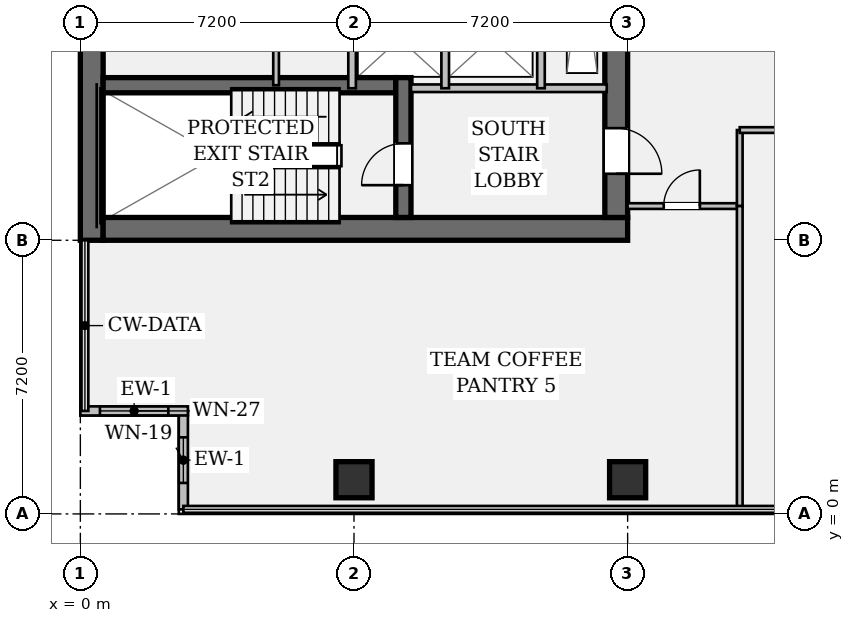
"""IFC4 building model, lengths in metres.
Left out: names, types, materials, properties, quantities, classifications, styles, units other than length and angle.
Written with IfcOpenShell. Run it as: python <this file> out.ifc"""

import sys

from ifc_helpers import new_model, si_unit, direction, frame, frame_2d, origin, origin_2d, place, context, subcontext, project, spatial, rectangle, hollow_rectangle, extrude, element, fill, save


model = new_model("IFC4")
c1 = context("Model", 3, precision=1e-05, world=origin(), true_north=direction((0.0, 1.0)))
c2 = subcontext(c1, "Body", "Model", "MODEL_VIEW")
j1 = project(units=[si_unit("LENGTHUNIT", "METRE"), si_unit("PLANEANGLEUNIT", "RADIAN")], contexts=[c1])
p1 = place(None, origin())
s1 = spatial("IfcSite", under=j1, at=p1, CompositionType="ELEMENT")
p2 = place(p1, origin())
s2 = spatial("IfcBuilding", under=s1, at=p2, CompositionType="ELEMENT")
p3 = place(p2, frame((0.0, 0.0, 88.9)))
s3 = spatial("IfcBuildingStorey", under=s2, at=p3, CompositionType="ELEMENT", Elevation=88.9)
p4 = place(p3, frame((0.3, 7.2, 0.0), z_axis=(0.0, 0.0, 1.0), x_axis=(0.0, 1.0, 0.0)))
e1 = element("IfcWall", 1, at=p4, inside=s3, PredefinedType="SHEAR", context=c2, shape_type="SweptSolid", body=[
    extrude(rectangle(XDim=28.8, YDim=0.6, at=frame_2d((14.4, 0.0))), origin(), (0.0, 0.0, 1.0), 3.57),
])
p5 = place(p3, frame((0.6, 7.5, 0.0), z_axis=(0.0, 0.0, 1.0), x_axis=(1.0, 0.0, 0.0)))
e2 = element("IfcWall", 2, at=p5, inside=s3, PredefinedType="SHEAR", context=c2, shape_type="SweptSolid", body=[
    extrude(rectangle(XDim=13.8, YDim=0.6, at=frame_2d((6.9, 0.0))), origin(), (0.0, 0.0, 1.0), 3.57),
])
p6 = place(p3, frame((14.1, 35.4, 0.0), z_axis=(0.0, 0.0, 1.0), x_axis=(0.0, -1.0, 0.0)))
e3 = element("IfcWall", 3, at=p6, inside=s3, PredefinedType="SHEAR", context=c2, shape_type="SweptSolid", body=[
    extrude(rectangle(XDim=27.6, YDim=0.6, at=frame_2d((13.8, 0.0))), origin(), (0.0, 0.0, 1.0), 3.57),
])
p7 = place(p6, frame((1.3, 0.0, 0.0)))
e4 = element("IfcOpeningElement", 4, at=p7, cuts=e3, PredefinedType="OPENING", context=c2, shape_type="SweptSolid", body=[
    extrude(rectangle(XDim=1.2, YDim=2.15, at=frame_2d((0.6, 1.075))), frame((0.0, 0.312, 0.0), z_axis=(0.0, -1.0, 0.0), x_axis=(1.0, 0.0, 0.0)), (0.0, 0.0, 1.0), 0.624),
])
p8 = place(p6, frame((25.25, 0.0, 0.0)))
e5 = element("IfcOpeningElement", 5, at=p8, cuts=e3, PredefinedType="OPENING", context=c2, shape_type="SweptSolid", body=[
    extrude(rectangle(XDim=1.2, YDim=2.15, at=frame_2d((0.6, 1.075))), frame((0.0, 0.312, 0.0), z_axis=(0.0, -1.0, 0.0), x_axis=(1.0, 0.0, 0.0)), (0.0, 0.0, 1.0), 0.624),
])
p9 = place(p6, frame((14.6, 0.0, 0.0)))
e6 = element("IfcOpeningElement", 6, at=p9, cuts=e3, PredefinedType="OPENING", context=c2, shape_type="SweptSolid", body=[
    extrude(rectangle(XDim=1.6, YDim=2.2, at=frame_2d((0.8, 1.1))), frame((0.0, 0.312, 0.0), z_axis=(0.0, -1.0, 0.0), x_axis=(1.0, 0.0, 0.0)), (0.0, 0.0, 1.0), 0.624),
])
p10 = place(p3, frame((0.6, 11.28, 0.0), z_axis=(0.0, 0.0, 1.0), x_axis=(1.0, 0.0, 0.0)))
e7 = element("IfcWall", 7, at=p10, inside=s3, PredefinedType="SHEAR", context=c2, shape_type="SweptSolid", body=[
    extrude(rectangle(XDim=7.7, YDim=0.4, at=frame_2d((3.85, 0.0))), origin(), (0.0, 0.0, 1.0), 3.57),
])
p11 = place(p3, frame((8.5, 7.8, 0.0), z_axis=(0.0, 0.0, 1.0), x_axis=(0.0, 1.0, 0.0)))
e8 = element("IfcWall", 8, at=p11, inside=s3, PredefinedType="SHEAR", context=c2, shape_type="SweptSolid", body=[
    extrude(rectangle(XDim=3.68, YDim=0.4, at=frame_2d((1.84, 0.0))), origin(), (0.0, 0.0, 1.0), 3.57),
])
p12 = place(p11, frame((0.85, 0.0, 0.0)))
e9 = element("IfcOpeningElement", 9, at=p12, cuts=e8, PredefinedType="OPENING", context=c2, shape_type="SweptSolid", body=[
    extrude(rectangle(XDim=1.1, YDim=2.15, at=frame_2d((0.55, 1.075))), frame((0.0, 0.212, 0.0), z_axis=(0.0, -1.0, 0.0), x_axis=(1.0, 0.0, 0.0)), (0.0, 0.0, 1.0), 0.424),
])
for number, where, z_axis, x_axis in (
    (10, (7.2, 0.9, 0.0), (0.0, 0.0, 1.0), (1.0, 0.0, 0.0)),
    (11, (14.4, 0.9, 0.0), (0.0, 0.0, 1.0), (1.0, 0.0, 0.0)),
):
    element("IfcColumn", number, at=place(p3, frame(where, z_axis=z_axis, x_axis=x_axis)), inside=s3, PredefinedType="COLUMN", context=c2, shape_type="SweptSolid", body=[
        extrude(hollow_rectangle(XDim=0.95, YDim=0.95, WallThickness=0.06, at=origin_2d()), origin(), (0.0, 0.0, 1.0), 3.57),
    ])
p13 = place(p3, frame((2.71, 0.12, 0.0), z_axis=(0.0, 0.0, 1.0), x_axis=(0.0, 1.0, 0.0)))
e12 = element("IfcWall", 12, at=p13, inside=s3, PredefinedType="STANDARD", context=c2, shape_type="SweptSolid", body=[
    extrude(rectangle(XDim=2.59, YDim=0.24, at=frame_2d((1.295, 0.0))), origin(), (0.0, 0.0, 1.0), 3.57),
])
p14 = place(p13, frame((0.695, 0.0, 0.95)))
e13 = element("IfcOpeningElement", 13, at=p14, cuts=e12, PredefinedType="OPENING", context=c2, shape_type="SweptSolid", body=[
    extrude(rectangle(XDim=1.2, YDim=1.8, at=frame_2d((0.6, 0.9))), frame((0.0, 0.132, 0.0), z_axis=(0.0, -1.0, 0.0), x_axis=(1.0, 0.0, 0.0)), (0.0, 0.0, 1.0), 0.264),
])
p15 = place(p3, frame((2.83, 2.71, 0.0), z_axis=(0.0, 0.0, 1.0), x_axis=(-1.0, 0.0, 0.0)))
e14 = element("IfcWall", 14, at=p15, inside=s3, PredefinedType="STANDARD", context=c2, shape_type="SweptSolid", body=[
    extrude(rectangle(XDim=2.83, YDim=0.24, at=frame_2d((1.415, 0.0))), origin(), (0.0, 0.0, 1.0), 3.57),
])
p16 = place(p15, frame((0.515, 0.0, 0.95)))
e15 = element("IfcOpeningElement", 15, at=p16, cuts=e14, PredefinedType="OPENING", context=c2, shape_type="SweptSolid", body=[
    extrude(rectangle(XDim=1.8, YDim=1.35, at=frame_2d((0.9, 0.675))), frame((0.0, 0.132, 0.0), z_axis=(0.0, -1.0, 0.0), x_axis=(1.0, 0.0, 0.0)), (0.0, 0.0, 1.0), 0.264),
])
p17 = place(p3, frame((8.7, 11.2, 0.0), z_axis=(0.0, 0.0, 1.0), x_axis=(1.0, 0.0, 0.0)))
e16 = element("IfcWall", 16, at=p17, inside=s3, PredefinedType="PARTITIONING", context=c2, shape_type="SweptSolid", body=[
    extrude(rectangle(XDim=5.15, YDim=0.2, at=frame_2d((2.575, 0.0))), origin(), (0.0, 0.0, 1.0), 3.57),
])
for number, where, z_axis, x_axis in (
    (17, (7.15, 11.2, 0.0), (0.0, 0.0, 1.0), (0.0, 1.0, 0.0)),
    (18, (9.6, 11.2, 0.0), (0.0, 0.0, 1.0), (0.0, 1.0, 0.0)),
):
    element("IfcWall", number, at=place(p3, frame(where, z_axis=z_axis, x_axis=x_axis)), inside=s3, PredefinedType="PARTITIONING", context=c2, shape_type="SweptSolid", body=[
        extrude(rectangle(XDim=2.4, YDim=0.2, at=frame_2d((1.2, 0.0))), origin(), (0.0, 0.0, 1.0), 3.57),
    ])
p18 = place(p3, frame((12.12, 11.2, 0.0), z_axis=(0.0, 0.0, 1.0), x_axis=(0.0, 1.0, 0.0)))
e19 = element("IfcWall", 19, at=p18, inside=s3, PredefinedType="PARTITIONING", context=c2, shape_type="SweptSolid", body=[
    extrude(rectangle(XDim=6.6, YDim=0.2, at=frame_2d((3.3, 0.0))), origin(), (0.0, 0.0, 1.0), 3.57),
])
p19 = place(p18, frame((2.95, 0.0, 0.0)))
e20 = element("IfcOpeningElement", 20, at=p19, cuts=e19, PredefinedType="OPENING", context=c2, shape_type="SweptSolid", body=[
    extrude(rectangle(XDim=0.85, YDim=2.15, at=frame_2d((0.425, 1.075))), frame((0.0, 0.112, 0.0), z_axis=(0.0, -1.0, 0.0), x_axis=(1.0, 0.0, 0.0)), (0.0, 0.0, 1.0), 0.224),
])
p20 = place(p3, frame((5.15, 11.28, 0.0), z_axis=(0.0, 0.0, 1.0), x_axis=(0.0, 1.0, 0.0)))
e21 = element("IfcWall", 21, at=p20, inside=s3, PredefinedType="PARTITIONING", context=c2, shape_type="SweptSolid", body=[
    extrude(rectangle(XDim=4.42, YDim=0.15, at=frame_2d((2.21, 0.0))), origin(), (0.0, 0.0, 1.0), 3.57),
])
p21 = place(p3, frame((14.4, 8.1, 0.0), z_axis=(0.0, 0.0, 1.0), x_axis=(1.0, 0.0, 0.0)))
e22 = element("IfcWall", 22, at=p21, inside=s3, PredefinedType="PARTITIONING", context=c2, shape_type="SweptSolid", body=[
    extrude(rectangle(XDim=2.95, YDim=0.15, at=frame_2d((1.475, 0.0))), origin(), (0.0, 0.0, 1.0), 3.088),
])
p22 = place(p21, frame((0.95, 0.0, 0.0)))
e23 = element("IfcOpeningElement", 23, at=p22, cuts=e22, PredefinedType="OPENING", context=c2, shape_type="SweptSolid", body=[
    extrude(rectangle(XDim=0.95, YDim=2.15, at=frame_2d((0.475, 1.075))), frame((0.0, 0.087, 0.0), z_axis=(0.0, -1.0, 0.0), x_axis=(1.0, 0.0, 0.0)), (0.0, 0.0, 1.0), 0.174),
])
p23 = place(p3, frame((17.35, 8.1, 0.0), z_axis=(0.0, 0.0, 1.0), x_axis=(0.0, 1.0, 0.0)))
e24 = element("IfcWall", 24, at=p23, inside=s3, PredefinedType="PARTITIONING", context=c2, shape_type="SweptSolid", body=[
    extrude(rectangle(XDim=2.0, YDim=0.15, at=frame_2d((1.0, 0.0))), origin(), (0.0, 0.0, 1.0), 3.57),
])
p24 = place(p3, frame((17.35, 10.1, 0.0), z_axis=(0.0, 0.0, 1.0), x_axis=(1.0, 0.0, 0.0)))
e25 = element("IfcWall", 25, at=p24, inside=s3, PredefinedType="PARTITIONING", context=c2, shape_type="SweptSolid", body=[
    extrude(rectangle(XDim=21.05, YDim=0.15, at=frame_2d((10.525, 0.0))), origin(), (0.0, 0.0, 1.0), 2.783),
])
p25 = place(p24, frame((3.12, 0.0, 0.0)))
e26 = element("IfcOpeningElement", 26, at=p25, cuts=e25, PredefinedType="OPENING", context=c2, shape_type="SweptSolid", body=[
    extrude(rectangle(XDim=0.95, YDim=2.15, at=frame_2d((0.475, 1.075))), frame((0.0, 0.087, 0.0), z_axis=(0.0, -1.0, 0.0), x_axis=(1.0, 0.0, 0.0)), (0.0, 0.0, 1.0), 0.174),
])
p26 = place(p24, frame((10.65, 0.0, 0.0)))
e27 = element("IfcOpeningElement", 27, at=p26, cuts=e25, PredefinedType="OPENING", context=c2, shape_type="SweptSolid", body=[
    extrude(rectangle(XDim=0.95, YDim=2.15, at=frame_2d((0.475, 1.075))), frame((0.0, 0.087, 0.0), z_axis=(0.0, -1.0, 0.0), x_axis=(1.0, 0.0, 0.0)), (0.0, 0.0, 1.0), 0.174),
])
p27 = place(p24, frame((17.55, 0.0, 0.0)))
e28 = element("IfcOpeningElement", 28, at=p27, cuts=e25, PredefinedType="OPENING", context=c2, shape_type="SweptSolid", body=[
    extrude(rectangle(XDim=0.95, YDim=2.15, at=frame_2d((0.475, 1.075))), frame((0.0, 0.087, 0.0), z_axis=(0.0, -1.0, 0.0), x_axis=(1.0, 0.0, 0.0)), (0.0, 0.0, 1.0), 0.174),
])
p28 = place(p3, frame((17.35, 0.12, 0.0), z_axis=(0.0, 0.0, 1.0), x_axis=(0.0, 1.0, 0.0)))
e29 = element("IfcWall", 29, at=p28, inside=s3, PredefinedType="PARTITIONING", context=c2, shape_type="SweptSolid", body=[
    extrude(rectangle(XDim=7.98, YDim=0.15, at=frame_2d((3.99, 0.0))), origin(), (0.0, 0.0, 1.0), 2.783),
])
p29 = place(p14, origin())
e30 = element("IfcWindow", 30, at=p29, inside=s3, PartitioningType="SINGLE_PANEL", PredefinedType="WINDOW", context=c2, shape_type="SweptSolid", body=[
    extrude(rectangle(XDim=1.2, YDim=1.8, at=frame_2d((0.6, 0.9))), frame((0.0, 0.03, 0.0), z_axis=(0.0, -1.0, 0.0), x_axis=(1.0, 0.0, 0.0)), (0.0, 0.0, 1.0), 0.06),
])
fill(e13, e30)
p30 = place(p16, origin())
e31 = element("IfcWindow", 31, at=p30, inside=s3, PartitioningType="SINGLE_PANEL", PredefinedType="WINDOW", context=c2, shape_type="SweptSolid", body=[
    extrude(rectangle(XDim=1.8, YDim=1.35, at=frame_2d((0.9, 0.675))), frame((0.0, 0.03, 0.0), z_axis=(0.0, -1.0, 0.0), x_axis=(1.0, 0.0, 0.0)), (0.0, 0.0, 1.0), 0.06),
])
fill(e15, e31)
p31 = place(p12, origin())
e32 = element("IfcDoor", 32, at=p31, inside=s3, OperationType="SINGLE_SWING_LEFT", PredefinedType="DOOR", context=c2, shape_type="SweptSolid", body=[
    extrude(rectangle(XDim=1.1, YDim=2.15, at=frame_2d((0.55, 1.075))), frame((0.0, 0.025, 0.0), z_axis=(0.0, -1.0, 0.0), x_axis=(1.0, 0.0, 0.0)), (0.0, 0.0, 1.0), 0.05),
])
fill(e9, e32)
p32 = place(p8, origin())
e33 = element("IfcDoor", 33, at=p32, inside=s3, OperationType="SINGLE_SWING_RIGHT", PredefinedType="DOOR", context=c2, shape_type="SweptSolid", body=[
    extrude(rectangle(XDim=1.2, YDim=2.15, at=frame_2d((0.6, 1.075))), frame((0.0, 0.025, 0.0), z_axis=(0.0, -1.0, 0.0), x_axis=(1.0, 0.0, 0.0)), (0.0, 0.0, 1.0), 0.05),
])
fill(e5, e33)
p33 = place(p22, origin())
e34 = element("IfcDoor", 34, at=p33, inside=s3, OperationType="SINGLE_SWING_RIGHT", PredefinedType="DOOR", context=c2, shape_type="SweptSolid", body=[
    extrude(rectangle(XDim=0.95, YDim=2.15, at=frame_2d((0.475, 1.075))), frame((0.0, 0.025, 0.0), z_axis=(0.0, -1.0, 0.0), x_axis=(1.0, 0.0, 0.0)), (0.0, 0.0, 1.0), 0.05),
])
fill(e23, e34)
save(model, sys.argv[1])
